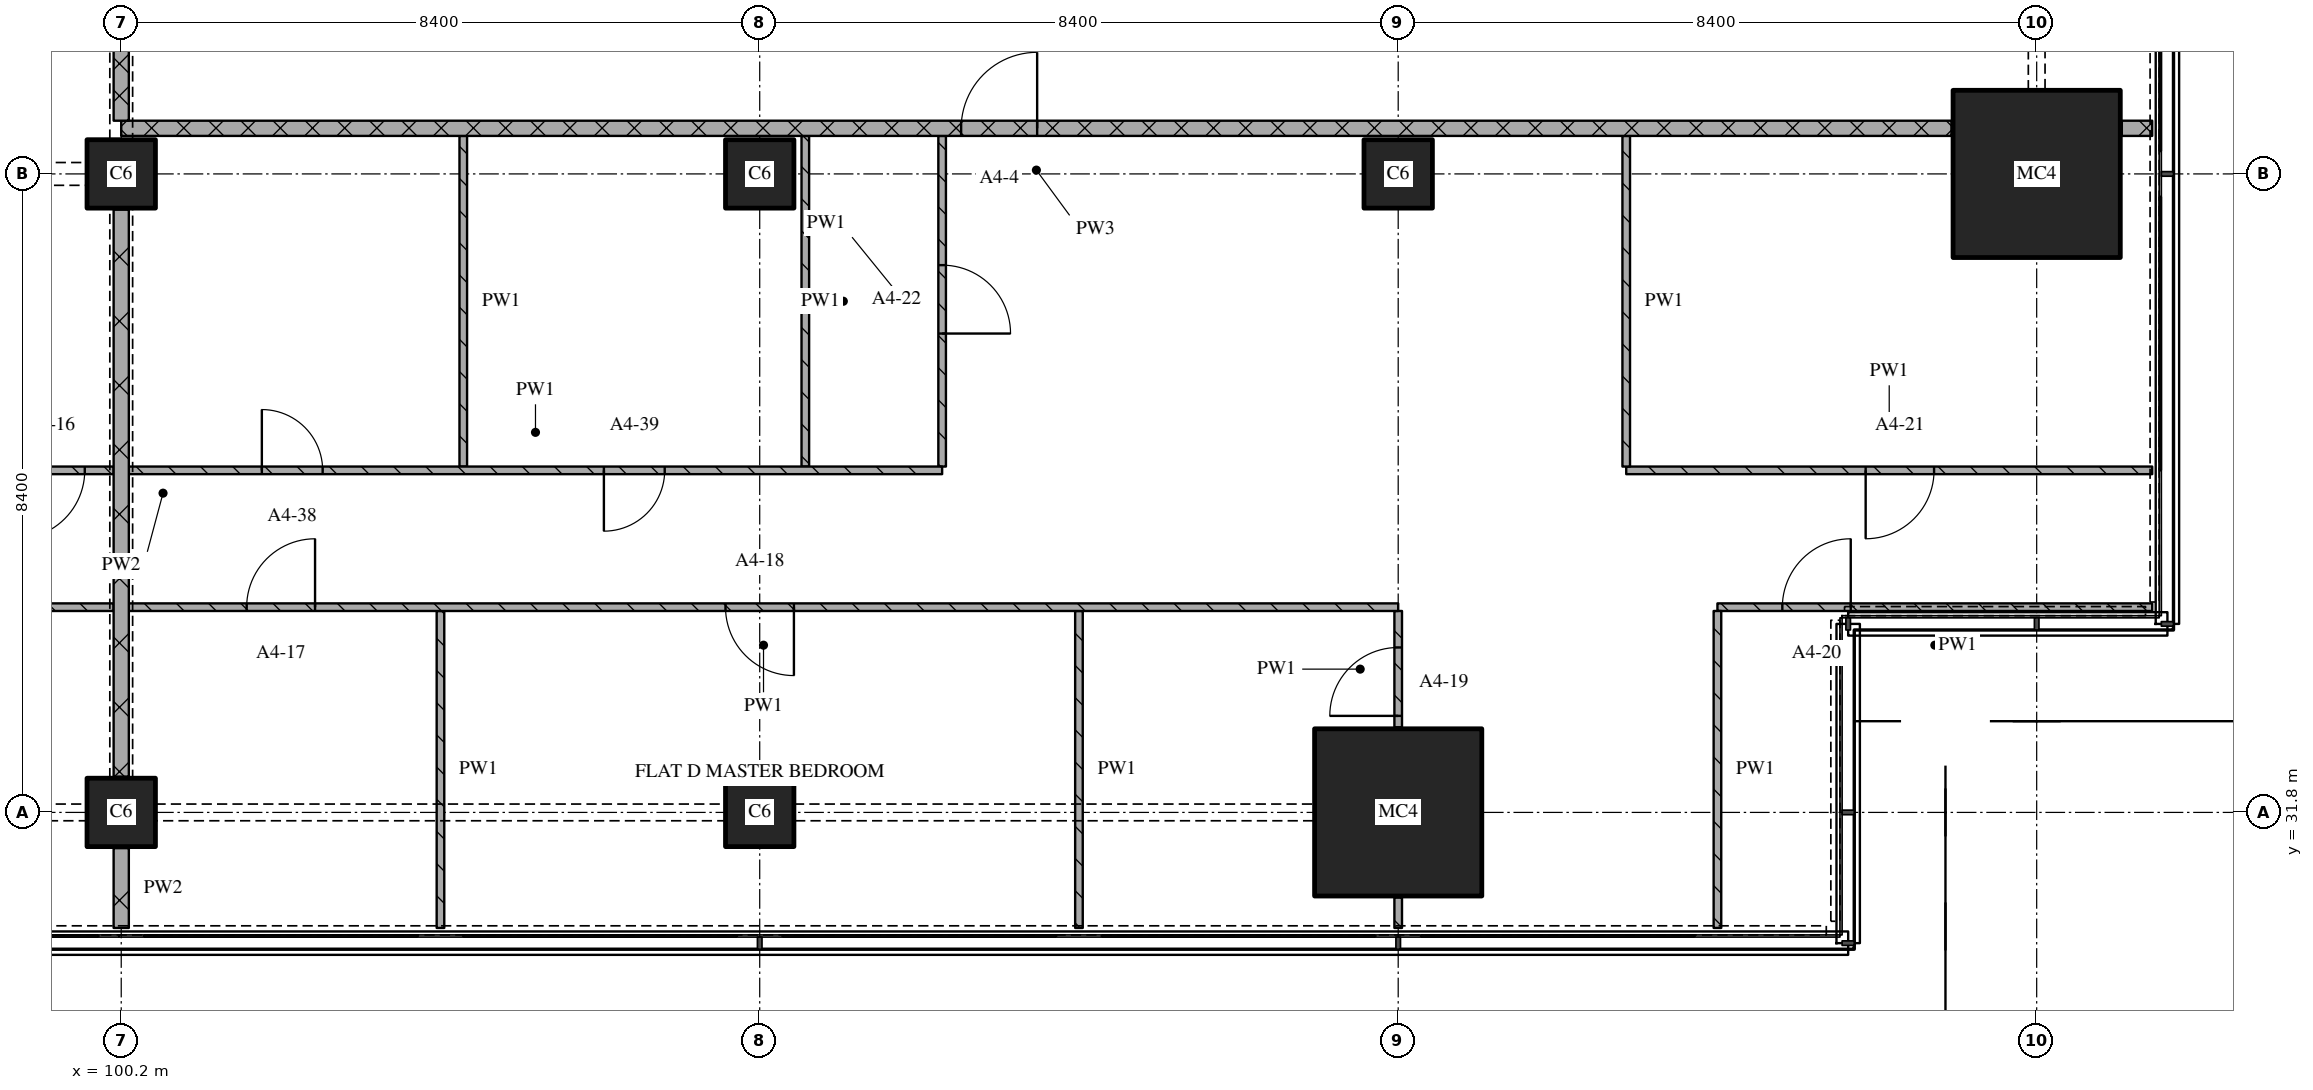
"""IFC4 building model, lengths in metres.
Left out: names, types, materials, properties, quantities, classifications, styles, units other than length and angle.
Written with IfcOpenShell. Run it as: python <this file> out.ifc"""

import sys

from ifc_helpers import new_model, si_unit, direction, frame, frame_2d, origin, origin_2d, place, context, subcontext, project, spatial, rectangle, extrude, element, fill, save


model = new_model("IFC4")
c1 = context("Model", 3, precision=1e-05, world=origin(), true_north=direction((0.0, 1.0)))
c2 = subcontext(c1, "Body", "Model", "MODEL_VIEW")
j1 = project(units=[si_unit("LENGTHUNIT", "METRE"), si_unit("PLANEANGLEUNIT", "RADIAN")], contexts=[c1])
p1 = place(None, origin())
s1 = spatial("IfcSite", under=j1, at=p1, CompositionType="ELEMENT")
p2 = place(p1, origin())
s2 = spatial("IfcBuilding", under=s1, at=p2, CompositionType="ELEMENT")
p3 = place(p2, frame((0.0, 0.0, 69.6)))
s3 = spatial("IfcBuildingStorey", under=s2, at=p3, CompositionType="ELEMENT", Elevation=69.6)
for number, where, z_axis, x_axis in (
    (1, (100.2, 31.8, 0.0), (0.0, 0.0, 1.0), (1.0, 0.0, 0.0)),
    (2, (100.2, 40.2, 0.0), (0.0, 0.0, 1.0), (1.0, 0.0, 0.0)),
    (3, (108.6, 31.8, 0.0), (0.0, 0.0, 1.0), (1.0, 0.0, 0.0)),
    (4, (108.6, 40.2, 0.0), (0.0, 0.0, 1.0), (1.0, 0.0, 0.0)),
):
    element("IfcColumn", number, at=place(p3, frame(where, z_axis=z_axis, x_axis=x_axis)), inside=s3, PredefinedType="COLUMN", context=c2, shape_type="SweptSolid", body=[
        extrude(rectangle(XDim=0.9, YDim=0.9, at=origin_2d()), origin(), (0.0, 0.0, 1.0), 3.6),
    ])
p4 = place(p3, frame((117.0, 31.8, 0.0), z_axis=(0.0, 0.0, 1.0), x_axis=(1.0, 0.0, 0.0)))
e5 = element("IfcColumn", 5, at=p4, inside=s3, PredefinedType="COLUMN", context=c2, shape_type="SweptSolid", body=[
    extrude(rectangle(XDim=2.2, YDim=2.2, at=origin_2d()), origin(), (0.0, 0.0, 1.0), 3.6),
])
p5 = place(p3, frame((117.0, 40.2, 0.0), z_axis=(0.0, 0.0, 1.0), x_axis=(1.0, 0.0, 0.0)))
e6 = element("IfcColumn", 6, at=p5, inside=s3, PredefinedType="COLUMN", context=c2, shape_type="SweptSolid", body=[
    extrude(rectangle(XDim=0.9, YDim=0.9, at=origin_2d()), origin(), (0.0, 0.0, 1.0), 3.6),
])
p6 = place(p3, frame((125.4, 40.2, 0.0), z_axis=(0.0, 0.0, 1.0), x_axis=(1.0, 0.0, 0.0)))
e7 = element("IfcColumn", 7, at=p6, inside=s3, PredefinedType="COLUMN", context=c2, shape_type="SweptSolid", body=[
    extrude(rectangle(XDim=2.2, YDim=2.2, at=origin_2d()), origin(), (0.0, 0.0, 1.0), 3.6),
])
p7 = place(p3, frame((126.92, 34.5, 0.0), z_axis=(0.0, 0.0, 1.0), x_axis=(-1.0, 0.0, 0.0)))
e8 = element("IfcWall", 8, at=p7, inside=s3, PredefinedType="PARTITIONING", context=c2, shape_type="SweptSolid", body=[
    extrude(rectangle(XDim=5.72, YDim=0.1, at=frame_2d((2.86, 0.0))), origin(), (0.0, 0.0, 1.0), 3.32),
])
p8 = place(p7, frame((3.966, 0.0, 0.0)))
e9 = element("IfcOpeningElement", 9, at=p8, cuts=e8, PredefinedType="OPENING", context=c2, shape_type="SweptSolid", body=[
    extrude(rectangle(XDim=0.9, YDim=2.1, at=frame_2d((0.45, 1.05))), frame((0.0, 0.06, 0.0), z_axis=(0.0, -1.0, 0.0), x_axis=(1.0, 0.0, 0.0)), (0.0, 0.0, 1.0), 0.12),
])
p9 = place(p3, frame((120.0, 36.3, 0.0), z_axis=(0.0, 0.0, 1.0), x_axis=(1.0, 0.0, 0.0)))
e10 = element("IfcWall", 10, at=p9, inside=s3, PredefinedType="PARTITIONING", context=c2, shape_type="SweptSolid", body=[
    extrude(rectangle(XDim=6.92, YDim=0.1, at=frame_2d((3.46, 0.0))), origin(), (0.0, 0.0, 1.0), 3.32),
])
p10 = place(p9, frame((3.15, 0.0, 0.0)))
e11 = element("IfcOpeningElement", 11, at=p10, cuts=e10, PredefinedType="OPENING", context=c2, shape_type="SweptSolid", body=[
    extrude(rectangle(XDim=0.9, YDim=2.1, at=frame_2d((0.45, 1.05))), frame((0.0, 0.06, 0.0), z_axis=(0.0, -1.0, 0.0), x_axis=(1.0, 0.0, 0.0)), (0.0, 0.0, 1.0), 0.12),
])
p11 = place(p3, frame((124.28, 40.8, 0.0), z_axis=(0.0, 0.0, 1.0), x_axis=(-1.0, 0.0, 0.0)))
e12 = element("IfcWall", 12, at=p11, inside=s3, PredefinedType="PARTITIONING", context=c2, shape_type="SweptSolid", body=[
    extrude(rectangle(XDim=24.08, YDim=0.2, at=frame_2d((12.04, 0.0))), origin(), (0.0, 0.0, 1.0), 3.32),
])
p12 = place(p11, frame((12.03, 0.0, 0.0)))
e13 = element("IfcOpeningElement", 13, at=p12, cuts=e12, PredefinedType="OPENING", context=c2, shape_type="SweptSolid", body=[
    extrude(rectangle(XDim=1.0, YDim=2.1, at=frame_2d((0.5, 1.05))), frame((0.0, 0.11, 0.0), z_axis=(0.0, -1.0, 0.0), x_axis=(1.0, 0.0, 0.0)), (0.0, 0.0, 1.0), 0.22),
])
p13 = place(p3, frame((126.52, 40.8, 0.0), z_axis=(0.0, 0.0, 1.0), x_axis=(1.0, 0.0, 0.0)))
e14 = element("IfcWall", 14, at=p13, inside=s3, PredefinedType="PARTITIONING", context=c2, shape_type="SweptSolid", body=[
    extrude(rectangle(XDim=0.4, YDim=0.2, at=frame_2d((0.2, 0.0))), origin(), (0.0, 0.0, 1.0), 3.32),
])
p14 = place(p3, frame((100.2, 43.1, 0.0), z_axis=(0.0, 0.0, 1.0), x_axis=(0.0, -1.0, 0.0)))
e15 = element("IfcWall", 15, at=p14, inside=s3, PredefinedType="PARTITIONING", context=c2, shape_type="SweptSolid", body=[
    extrude(rectangle(XDim=2.2, YDim=0.2, at=frame_2d((1.1, 0.0))), origin(), (0.0, 0.0, 1.0), 2.43),
])
p15 = place(p3, frame((100.2, 31.33, 0.0), z_axis=(0.0, 0.0, 1.0), x_axis=(0.0, -1.0, 0.0)))
e16 = element("IfcWall", 16, at=p15, inside=s3, PredefinedType="PARTITIONING", context=c2, shape_type="SweptSolid", body=[
    extrude(rectangle(XDim=1.05, YDim=0.2, at=frame_2d((0.525, 0.0))), origin(), (0.0, 0.0, 1.0), 3.32),
])
p16 = place(p3, frame((100.2, 39.73, 0.0), z_axis=(0.0, 0.0, 1.0), x_axis=(0.0, -1.0, 0.0)))
e17 = element("IfcWall", 17, at=p16, inside=s3, PredefinedType="PARTITIONING", context=c2, shape_type="SweptSolid", body=[
    extrude(rectangle(XDim=7.46, YDim=0.2, at=frame_2d((3.73, 0.0))), origin(), (0.0, 0.0, 1.0), 2.83),
])
p17 = place(p3, frame((104.4, 34.45, 0.0), z_axis=(0.0, 0.0, 1.0), x_axis=(0.0, -1.0, 0.0)))
e18 = element("IfcWall", 18, at=p17, inside=s3, PredefinedType="PARTITIONING", context=c2, shape_type="SweptSolid", body=[
    extrude(rectangle(XDim=4.17, YDim=0.1, at=frame_2d((2.085, 0.0))), origin(), (0.0, 0.0, 1.0), 3.32),
])
for number, where, z_axis, x_axis in (
    (19, (104.7, 40.7, 0.0), (0.0, 0.0, 1.0), (0.0, -1.0, 0.0)),
    (20, (109.2, 40.7, 0.0), (0.0, 0.0, 1.0), (0.0, -1.0, 0.0)),
):
    element("IfcWall", number, at=place(p3, frame(where, z_axis=z_axis, x_axis=x_axis)), inside=s3, PredefinedType="PARTITIONING", context=c2, shape_type="SweptSolid", body=[
        extrude(rectangle(XDim=4.35, YDim=0.1, at=frame_2d((2.175, 0.0))), origin(), (0.0, 0.0, 1.0), 3.32),
    ])
p18 = place(p3, frame((111.0, 36.35, 0.0), z_axis=(0.0, 0.0, 1.0), x_axis=(0.0, 1.0, 0.0)))
e21 = element("IfcWall", 21, at=p18, inside=s3, PredefinedType="PARTITIONING", context=c2, shape_type="SweptSolid", body=[
    extrude(rectangle(XDim=4.35, YDim=0.1, at=frame_2d((2.175, 0.0))), origin(), (0.0, 0.0, 1.0), 3.32),
])
p19 = place(p18, frame((1.75, 0.0, 0.0)))
e22 = element("IfcOpeningElement", 22, at=p19, cuts=e21, PredefinedType="OPENING", context=c2, shape_type="SweptSolid", body=[
    extrude(rectangle(XDim=0.9, YDim=2.1, at=frame_2d((0.45, 1.05))), frame((0.0, 0.06, 0.0), z_axis=(0.0, -1.0, 0.0), x_axis=(1.0, 0.0, 0.0)), (0.0, 0.0, 1.0), 0.12),
])
p20 = place(p3, frame((112.8, 34.45, 0.0), z_axis=(0.0, 0.0, 1.0), x_axis=(0.0, -1.0, 0.0)))
e23 = element("IfcWall", 23, at=p20, inside=s3, PredefinedType="PARTITIONING", context=c2, shape_type="SweptSolid", body=[
    extrude(rectangle(XDim=4.17, YDim=0.1, at=frame_2d((2.085, 0.0))), origin(), (0.0, 0.0, 1.0), 3.32),
])
p21 = place(p3, frame((117.0, 30.68, 0.0), z_axis=(0.0, 0.0, 1.0), x_axis=(0.0, -1.0, 0.0)))
e24 = element("IfcWall", 24, at=p21, inside=s3, PredefinedType="PARTITIONING", context=c2, shape_type="SweptSolid", body=[
    extrude(rectangle(XDim=0.4, YDim=0.1, at=frame_2d((0.2, 0.0))), origin(), (0.0, 0.0, 1.0), 3.32),
])
p22 = place(p3, frame((117.0, 32.92, 0.0), z_axis=(0.0, 0.0, 1.0), x_axis=(0.0, 1.0, 0.0)))
e25 = element("IfcWall", 25, at=p22, inside=s3, PredefinedType="PARTITIONING", context=c2, shape_type="SweptSolid", body=[
    extrude(rectangle(XDim=1.53, YDim=0.1, at=frame_2d((0.765, 0.0))), origin(), (0.0, 0.0, 1.0), 3.32),
])
p23 = place(p22, frame((0.15, 0.0, 0.0)))
e26 = element("IfcOpeningElement", 26, at=p23, cuts=e25, PredefinedType="OPENING", context=c2, shape_type="SweptSolid", body=[
    extrude(rectangle(XDim=0.9, YDim=2.1, at=frame_2d((0.45, 1.05))), frame((0.0, 0.06, 0.0), z_axis=(0.0, -1.0, 0.0), x_axis=(1.0, 0.0, 0.0)), (0.0, 0.0, 1.0), 0.12),
])
p24 = place(p3, frame((120.0, 40.7, 0.0), z_axis=(0.0, 0.0, 1.0), x_axis=(0.0, -1.0, 0.0)))
e27 = element("IfcWall", 27, at=p24, inside=s3, PredefinedType="PARTITIONING", context=c2, shape_type="SweptSolid", body=[
    extrude(rectangle(XDim=4.35, YDim=0.1, at=frame_2d((2.175, 0.0))), origin(), (0.0, 0.0, 1.0), 3.32),
])
p25 = place(p3, frame((121.2, 34.45, 0.0), z_axis=(0.0, 0.0, 1.0), x_axis=(0.0, -1.0, 0.0)))
e28 = element("IfcWall", 28, at=p25, inside=s3, PredefinedType="PARTITIONING", context=c2, shape_type="SweptSolid", body=[
    extrude(rectangle(XDim=4.17, YDim=0.1, at=frame_2d((2.085, 0.0))), origin(), (0.0, 0.0, 1.0), 3.32),
])
p26 = place(p3, frame((100.1, 34.5, 0.0), z_axis=(0.0, 0.0, 1.0), x_axis=(-1.0, 0.0, 0.0)))
e29 = element("IfcWall", 29, at=p26, inside=s3, PredefinedType="PARTITIONING", context=c2, shape_type="SweptSolid", body=[
    extrude(rectangle(XDim=8.3, YDim=0.1, at=frame_2d((4.15, 0.0))), origin(), (0.0, 0.0, 1.0), 3.32),
])
p27 = place(p26, frame((3.65, 0.0, 0.0)))
e30 = element("IfcOpeningElement", 30, at=p27, cuts=e29, PredefinedType="OPENING", context=c2, shape_type="SweptSolid", body=[
    extrude(rectangle(XDim=0.9, YDim=2.1, at=frame_2d((0.45, 1.05))), frame((0.0, 0.06, 0.0), z_axis=(0.0, -1.0, 0.0), x_axis=(1.0, 0.0, 0.0)), (0.0, 0.0, 1.0), 0.12),
])
p28 = place(p3, frame((117.0, 34.5, 0.0), z_axis=(0.0, 0.0, 1.0), x_axis=(-1.0, 0.0, 0.0)))
e31 = element("IfcWall", 31, at=p28, inside=s3, PredefinedType="PARTITIONING", context=c2, shape_type="SweptSolid", body=[
    extrude(rectangle(XDim=16.7, YDim=0.1, at=frame_2d((8.35, 0.0))), origin(), (0.0, 0.0, 1.0), 3.32),
])
p29 = place(p28, frame((7.95, 0.0, 0.0)))
e32 = element("IfcOpeningElement", 32, at=p29, cuts=e31, PredefinedType="OPENING", context=c2, shape_type="SweptSolid", body=[
    extrude(rectangle(XDim=0.9, YDim=2.1, at=frame_2d((0.45, 1.05))), frame((0.0, 0.06, 0.0), z_axis=(0.0, -1.0, 0.0), x_axis=(1.0, 0.0, 0.0)), (0.0, 0.0, 1.0), 0.12),
])
p30 = place(p28, frame((14.25, 0.0, 0.0)))
e33 = element("IfcOpeningElement", 33, at=p30, cuts=e31, PredefinedType="OPENING", context=c2, shape_type="SweptSolid", body=[
    extrude(rectangle(XDim=0.9, YDim=2.1, at=frame_2d((0.45, 1.05))), frame((0.0, 0.06, 0.0), z_axis=(0.0, -1.0, 0.0), x_axis=(1.0, 0.0, 0.0)), (0.0, 0.0, 1.0), 0.12),
])
p31 = place(p3, frame((94.5, 36.3, 0.0), z_axis=(0.0, 0.0, 1.0), x_axis=(1.0, 0.0, 0.0)))
e34 = element("IfcWall", 34, at=p31, inside=s3, PredefinedType="PARTITIONING", context=c2, shape_type="SweptSolid", body=[
    extrude(rectangle(XDim=5.6, YDim=0.1, at=frame_2d((2.8, 0.0))), origin(), (0.0, 0.0, 1.0), 3.32),
])
p32 = place(p31, frame((4.32, 0.0, 0.0)))
e35 = element("IfcOpeningElement", 35, at=p32, cuts=e34, PredefinedType="OPENING", context=c2, shape_type="SweptSolid", body=[
    extrude(rectangle(XDim=0.9, YDim=2.1, at=frame_2d((0.45, 1.05))), frame((0.0, 0.06, 0.0), z_axis=(0.0, -1.0, 0.0), x_axis=(1.0, 0.0, 0.0)), (0.0, 0.0, 1.0), 0.12),
])
p33 = place(p3, frame((100.3, 36.3, 0.0), z_axis=(0.0, 0.0, 1.0), x_axis=(1.0, 0.0, 0.0)))
e36 = element("IfcWall", 36, at=p33, inside=s3, PredefinedType="PARTITIONING", context=c2, shape_type="SweptSolid", body=[
    extrude(rectangle(XDim=10.7, YDim=0.1, at=frame_2d((5.35, 0.0))), origin(), (0.0, 0.0, 1.0), 3.32),
])
p34 = place(p33, frame((1.75, 0.0, 0.0)))
e37 = element("IfcOpeningElement", 37, at=p34, cuts=e36, PredefinedType="OPENING", context=c2, shape_type="SweptSolid", body=[
    extrude(rectangle(XDim=0.8, YDim=2.1, at=frame_2d((0.4, 1.05))), frame((0.0, 0.06, 0.0), z_axis=(0.0, -1.0, 0.0), x_axis=(1.0, 0.0, 0.0)), (0.0, 0.0, 1.0), 0.12),
])
p35 = place(p33, frame((6.25, 0.0, 0.0)))
e38 = element("IfcOpeningElement", 38, at=p35, cuts=e36, PredefinedType="OPENING", context=c2, shape_type="SweptSolid", body=[
    extrude(rectangle(XDim=0.8, YDim=2.1, at=frame_2d((0.4, 1.05))), frame((0.0, 0.06, 0.0), z_axis=(0.0, -1.0, 0.0), x_axis=(1.0, 0.0, 0.0)), (0.0, 0.0, 1.0), 0.12),
])
p36 = place(p8, origin())
e39 = element("IfcDoor", 39, at=p36, inside=s3, OperationType="SINGLE_SWING_RIGHT", PredefinedType="DOOR", context=c2, shape_type="SweptSolid", body=[
    extrude(rectangle(XDim=0.9, YDim=2.1, at=frame_2d((0.45, 1.05))), frame((0.0, 0.025, 0.0), z_axis=(0.0, -1.0, 0.0), x_axis=(1.0, 0.0, 0.0)), (0.0, 0.0, 1.0), 0.05),
])
fill(e9, e39)
p37 = place(p10, origin())
e40 = element("IfcDoor", 40, at=p37, inside=s3, OperationType="SINGLE_SWING_RIGHT", PredefinedType="DOOR", context=c2, shape_type="SweptSolid", body=[
    extrude(rectangle(XDim=0.9, YDim=2.1, at=frame_2d((0.45, 1.05))), frame((0.0, 0.025, 0.0), z_axis=(0.0, -1.0, 0.0), x_axis=(1.0, 0.0, 0.0)), (0.0, 0.0, 1.0), 0.05),
])
fill(e11, e40)
p38 = place(p12, origin())
e41 = element("IfcDoor", 41, at=p38, inside=s3, OperationType="SINGLE_SWING_RIGHT", PredefinedType="DOOR", context=c2, shape_type="SweptSolid", body=[
    extrude(rectangle(XDim=1.0, YDim=2.1, at=frame_2d((0.5, 1.05))), frame((0.0, 0.025, 0.0), z_axis=(0.0, -1.0, 0.0), x_axis=(1.0, 0.0, 0.0)), (0.0, 0.0, 1.0), 0.05),
])
fill(e13, e41)
p39 = place(p19, origin())
e42 = element("IfcDoor", 42, at=p39, inside=s3, OperationType="SINGLE_SWING_RIGHT", PredefinedType="DOOR", context=c2, shape_type="SweptSolid", body=[
    extrude(rectangle(XDim=0.9, YDim=2.1, at=frame_2d((0.45, 1.05))), frame((0.0, 0.025, 0.0), z_axis=(0.0, -1.0, 0.0), x_axis=(1.0, 0.0, 0.0)), (0.0, 0.0, 1.0), 0.05),
])
fill(e22, e42)
p40 = place(p23, origin())
e43 = element("IfcDoor", 43, at=p40, inside=s3, OperationType="SINGLE_SWING_LEFT", PredefinedType="DOOR", context=c2, shape_type="SweptSolid", body=[
    extrude(rectangle(XDim=0.9, YDim=2.1, at=frame_2d((0.45, 1.05))), frame((0.0, 0.025, 0.0), z_axis=(0.0, -1.0, 0.0), x_axis=(1.0, 0.0, 0.0)), (0.0, 0.0, 1.0), 0.05),
])
fill(e26, e43)
p41 = place(p29, origin())
e44 = element("IfcDoor", 44, at=p41, inside=s3, OperationType="SINGLE_SWING_LEFT", PredefinedType="DOOR", context=c2, shape_type="SweptSolid", body=[
    extrude(rectangle(XDim=0.9, YDim=2.1, at=frame_2d((0.45, 1.05))), frame((0.0, 0.025, 0.0), z_axis=(0.0, -1.0, 0.0), x_axis=(1.0, 0.0, 0.0)), (0.0, 0.0, 1.0), 0.05),
])
fill(e32, e44)
p42 = place(p30, origin())
e45 = element("IfcDoor", 45, at=p42, inside=s3, OperationType="SINGLE_SWING_RIGHT", PredefinedType="DOOR", context=c2, shape_type="SweptSolid", body=[
    extrude(rectangle(XDim=0.9, YDim=2.1, at=frame_2d((0.45, 1.05))), frame((0.0, 0.025, 0.0), z_axis=(0.0, -1.0, 0.0), x_axis=(1.0, 0.0, 0.0)), (0.0, 0.0, 1.0), 0.05),
])
fill(e33, e45)
p43 = place(p32, origin())
e46 = element("IfcDoor", 46, at=p43, inside=s3, OperationType="SINGLE_SWING_RIGHT", PredefinedType="DOOR", context=c2, shape_type="SweptSolid", body=[
    extrude(rectangle(XDim=0.9, YDim=2.1, at=frame_2d((0.45, 1.05))), frame((0.0, 0.025, 0.0), z_axis=(0.0, -1.0, 0.0), x_axis=(1.0, 0.0, 0.0)), (0.0, 0.0, 1.0), 0.05),
])
fill(e35, e46)
p44 = place(p34, origin())
e47 = element("IfcDoor", 47, at=p44, inside=s3, OperationType="SINGLE_SWING_LEFT", PredefinedType="DOOR", context=c2, shape_type="SweptSolid", body=[
    extrude(rectangle(XDim=0.8, YDim=2.1, at=frame_2d((0.4, 1.05))), frame((0.0, 0.025, 0.0), z_axis=(0.0, -1.0, 0.0), x_axis=(1.0, 0.0, 0.0)), (0.0, 0.0, 1.0), 0.05),
])
fill(e37, e47)
p45 = place(p35, origin())
e48 = element("IfcDoor", 48, at=p45, inside=s3, OperationType="SINGLE_SWING_RIGHT", PredefinedType="DOOR", context=c2, shape_type="SweptSolid", body=[
    extrude(rectangle(XDim=0.8, YDim=2.1, at=frame_2d((0.4, 1.05))), frame((0.0, 0.025, 0.0), z_axis=(0.0, -1.0, 0.0), x_axis=(1.0, 0.0, 0.0)), (0.0, 0.0, 1.0), 0.05),
])
fill(e38, e48)
save(model, sys.argv[1])
